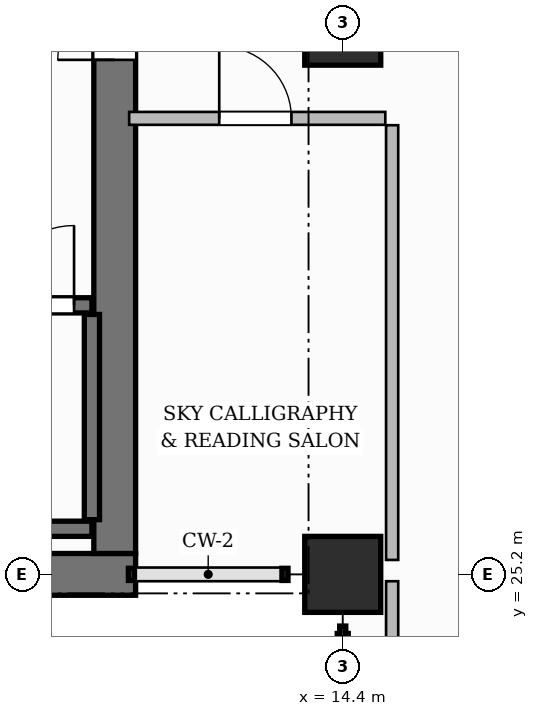
"""IFC4 building model, lengths in metres.
Left out: names, types, materials, properties, quantities, classifications, styles, units other than length and angle.
Written with IfcOpenShell. Run it as: python <this file> out.ifc"""

import sys

from ifc_helpers import new_model, si_unit, direction, frame, frame_2d, origin, origin_2d, place, context, subcontext, project, spatial, rectangle, extrude, source, transform, mapped, element, fill, save


model = new_model("IFC4")
c1 = context("Model", 3, precision=1e-05, world=origin(), true_north=direction((0.0, 1.0)))
c2 = subcontext(c1, "Body", "Model", "MODEL_VIEW")
j1 = project(units=[si_unit("LENGTHUNIT", "METRE"), si_unit("PLANEANGLEUNIT", "RADIAN")], contexts=[c1])
p1 = place(None, origin())
s1 = spatial("IfcSite", under=j1, at=p1, CompositionType="ELEMENT")
p2 = place(p1, origin())
s2 = spatial("IfcBuilding", under=s1, at=p2, CompositionType="ELEMENT")
p3 = place(p2, frame((0.0, 0.0, 111.8)))
s3 = spatial("IfcBuildingStorey", under=s2, at=p3, CompositionType="ELEMENT", Elevation=111.8)
p4 = place(p3, frame((3.325, 25.2, 0.0), z_axis=(0.0, 0.0, 1.0), x_axis=(1.0, 0.0, 0.0)))
e1 = element("IfcWall", 1, at=p4, inside=s3, PredefinedType="SHEAR", context=c2, shape_type="SweptSolid", body=[
    extrude(rectangle(XDim=8.35, YDim=0.55, at=frame_2d((4.175, 0.0))), origin(), (0.0, 0.0, 1.0), 3.7),
])
p5 = place(p3, frame((11.4, 25.475, 0.0), z_axis=(0.0, 0.0, 1.0), x_axis=(0.0, 1.0, 0.0)))
e2 = element("IfcWall", 2, at=p5, inside=s3, PredefinedType="SHEAR", context=c2, shape_type="SweptSolid", body=[
    extrude(rectangle(XDim=13.85, YDim=0.55, at=frame_2d((6.925, 0.0))), origin(), (0.0, 0.0, 1.0), 3.7),
])
p6 = place(p5, frame((6.495, 0.0, 0.0)))
e3 = element("IfcOpeningElement", 3, at=p6, cuts=e2, PredefinedType="OPENING", context=c2, shape_type="SweptSolid", body=[
    extrude(rectangle(XDim=1.5, YDim=2.2, at=frame_2d((0.75, 1.1))), frame((0.0, 0.285, 0.0), z_axis=(0.0, -1.0, 0.0), x_axis=(1.0, 0.0, 0.0)), (0.0, 0.0, 1.0), 0.57),
])
m1 = source(origin(), c2, "Body", "SweptSolid", [
    extrude(rectangle(XDim=1.0, YDim=1.0, at=origin_2d()), origin(), (0.0, 0.0, 1.0), 3.7),
])
for number, where, z_axis, x_axis in (
    (4, (14.4, 25.2, 0.0), (0.0, 0.0, 1.0), (1.0, 0.0, 0.0)),
    (5, (14.4, 32.4, 0.0), (0.0, 0.0, 1.0), (1.0, 0.0, 0.0)),
):
    element("IfcColumn", number, at=place(p3, frame(where, z_axis=z_axis, x_axis=x_axis)), inside=s3, PredefinedType="COLUMN", context=c2, shape_type="MappedRepresentation", body=[
        mapped(m1, transform((0.0, 0.0, 0.0), scale=1.0)),
    ])
p7 = place(p3, frame((4.0, 25.8, 0.0), z_axis=(0.0, 0.0, 1.0), x_axis=(1.0, 0.0, 0.0)))
e6 = element("IfcWall", 6, at=p7, inside=s3, PredefinedType="SHEAR", context=c2, shape_type="SweptSolid", body=[
    extrude(rectangle(XDim=7.1, YDim=0.2, at=frame_2d((3.55, 0.0))), origin(), (0.0, 0.0, 1.0), 3.7),
])
p8 = place(p3, frame((11.1, 25.92, 0.0), z_axis=(0.0, 0.0, 1.0), x_axis=(0.0, 1.0, 0.0)))
e7 = element("IfcWall", 7, at=p8, inside=s3, PredefinedType="SHEAR", context=c2, shape_type="SweptSolid", body=[
    extrude(rectangle(XDim=2.7, YDim=0.2, at=frame_2d((1.35, 0.0))), origin(), (0.0, 0.0, 1.0), 3.7),
])
p9 = place(p3, frame((4.0, 28.74, 0.0), z_axis=(0.0, 0.0, 1.0), x_axis=(1.0, 0.0, 0.0)))
e8 = element("IfcWall", 8, at=p9, inside=s3, PredefinedType="SHEAR", context=c2, shape_type="SweptSolid", body=[
    extrude(rectangle(XDim=7.1, YDim=0.2, at=frame_2d((3.55, 0.0))), origin(), (0.0, 0.0, 1.0), 3.7),
])
p10 = place(p9, frame((5.815, 0.0, 0.0)))
e9 = element("IfcOpeningElement", 9, at=p10, cuts=e8, PredefinedType="OPENING", context=c2, shape_type="SweptSolid", body=[
    extrude(rectangle(XDim=1.05, YDim=2.2, at=frame_2d((0.525, 1.1))), frame((0.0, 0.11, 0.0), z_axis=(0.0, -1.0, 0.0), x_axis=(1.0, 0.0, 0.0)), (0.0, 0.0, 1.0), 0.22),
])
p11 = place(p3, frame((15.05, 11.76, 0.0), z_axis=(0.0, 0.0, 1.0), x_axis=(0.0, 1.0, 0.0)))
e10 = element("IfcWall", 10, at=p11, inside=s3, PredefinedType="PARTITIONING", context=c2, shape_type="SweptSolid", body=[
    extrude(rectangle(XDim=13.35, YDim=0.16, at=frame_2d((6.675, 0.0))), origin(), (0.0, 0.0, 1.0), 3.45),
])
p12 = place(p3, frame((15.05, 25.39, 0.0), z_axis=(0.0, 0.0, 1.0), x_axis=(0.0, 1.0, 0.0)))
e11 = element("IfcWall", 11, at=p12, inside=s3, PredefinedType="PARTITIONING", context=c2, shape_type="SweptSolid", body=[
    extrude(rectangle(XDim=5.72, YDim=0.16, at=frame_2d((2.86, 0.0))), origin(), (0.0, 0.0, 1.0), 3.45),
])
p13 = place(p3, frame((11.59, 31.2, 0.0), z_axis=(0.0, 0.0, 1.0), x_axis=(1.0, 0.0, 0.0)))
e12 = element("IfcWall", 12, at=p13, inside=s3, PredefinedType="PARTITIONING", context=c2, shape_type="SweptSolid", body=[
    extrude(rectangle(XDim=3.37, YDim=0.17, at=frame_2d((1.685, 0.0))), origin(), (0.0, 0.0, 1.0), 3.45),
])
p14 = place(p13, frame((1.185, 0.0, 0.0)))
e13 = element("IfcOpeningElement", 13, at=p14, cuts=e12, PredefinedType="OPENING", context=c2, shape_type="SweptSolid", body=[
    extrude(rectangle(XDim=0.95, YDim=2.15, at=frame_2d((0.475, 1.075))), frame((0.0, 0.095, 0.0), z_axis=(0.0, -1.0, 0.0), x_axis=(1.0, 0.0, 0.0)), (0.0, 0.0, 1.0), 0.19),
])
m2 = source(origin(), c2, "Body", "SweptSolid", [
    extrude(rectangle(XDim=1.05, YDim=2.2, at=frame_2d((0.525, 1.1))), frame((0.0, 0.025, 0.0), z_axis=(0.0, -1.0, 0.0), x_axis=(1.0, 0.0, 0.0)), (0.0, 0.0, 1.0), 0.05),
])
p15 = place(p10, origin())
e14 = element("IfcDoor", 14, at=p15, inside=s3, OperationType="SINGLE_SWING_RIGHT", PredefinedType="DOOR", context=c2, shape_type="MappedRepresentation", body=[
    mapped(m2, transform((0.0, 0.0, 0.0), scale=1.0)),
])
fill(e9, e14)
m3 = source(origin(), c2, "Body", "SweptSolid", [
    extrude(rectangle(XDim=1.5, YDim=2.2, at=frame_2d((0.75, 1.1))), frame((0.0, 0.025, 0.0), z_axis=(0.0, -1.0, 0.0), x_axis=(1.0, 0.0, 0.0)), (0.0, 0.0, 1.0), 0.05),
])
p16 = place(p6, origin())
e15 = element("IfcDoor", 15, at=p16, inside=s3, OperationType="DOUBLE_DOOR_SINGLE_SWING", PredefinedType="DOOR", context=c2, shape_type="MappedRepresentation", body=[
    mapped(m3, transform((0.0, 0.0, 0.0), scale=1.0)),
])
fill(e3, e15)
m4 = source(origin(), c2, "Body", "SweptSolid", [
    extrude(rectangle(XDim=0.95, YDim=2.15, at=frame_2d((0.475, 1.075))), frame((0.0, 0.025, 0.0), z_axis=(0.0, -1.0, 0.0), x_axis=(1.0, 0.0, 0.0)), (0.0, 0.0, 1.0), 0.05),
])
p17 = place(p14, origin())
e16 = element("IfcDoor", 16, at=p17, inside=s3, OperationType="SINGLE_SWING_LEFT", PredefinedType="DOOR", context=c2, shape_type="MappedRepresentation", body=[
    mapped(m4, transform((0.0, 0.0, 0.0), scale=1.0)),
])
fill(e13, e16)
save(model, sys.argv[1])
